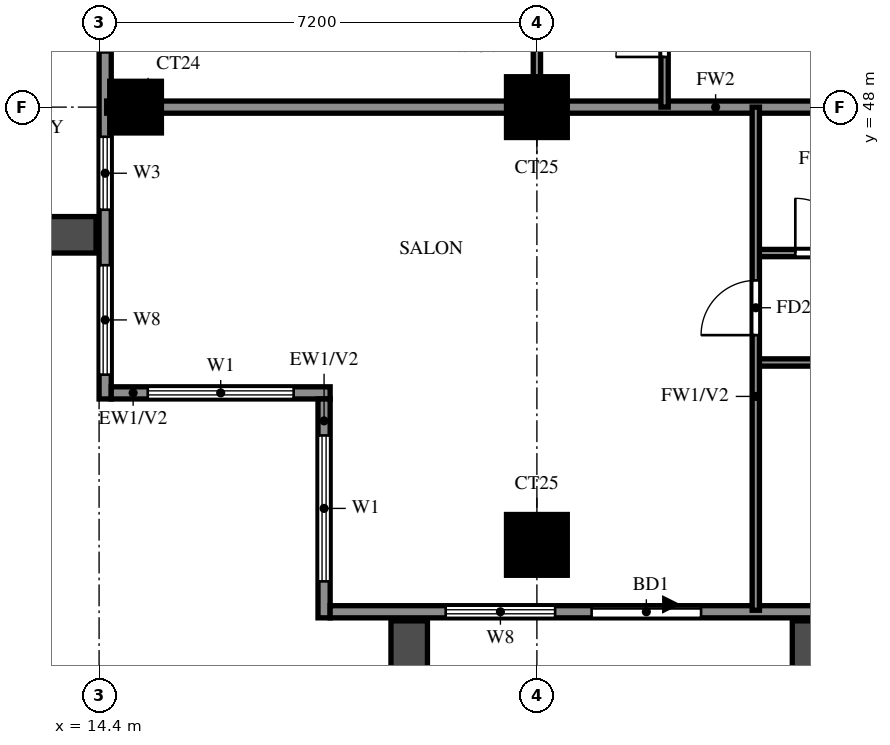
"""IFC4 building model, lengths in metres.
Left out: names, types, materials, properties, quantities, classifications, styles, units other than length and angle.
Written with IfcOpenShell. Run it as: python <this file> out.ifc"""

import sys

from ifc_helpers import new_model, si_unit, direction, frame, frame_2d, origin, origin_2d, place, context, subcontext, project, spatial, rectangle, extrude, source, transform, mapped, element, fill, save


model = new_model("IFC4")
c1 = context("Model", 3, precision=1e-05, world=origin(), true_north=direction((0.0, 1.0)))
c2 = subcontext(c1, "Body", "Model", "MODEL_VIEW")
j1 = project(units=[si_unit("LENGTHUNIT", "METRE"), si_unit("PLANEANGLEUNIT", "RADIAN")], contexts=[c1])
p1 = place(None, origin())
s1 = spatial("IfcSite", under=j1, at=p1, CompositionType="ELEMENT")
p2 = place(p1, origin())
s2 = spatial("IfcBuilding", under=s1, at=p2, CompositionType="ELEMENT")
p3 = place(p2, frame((0.0, 0.0, 171.0)))
s3 = spatial("IfcBuildingStorey", under=s2, at=p3, CompositionType="ELEMENT", Elevation=171.0)
m1 = source(origin(), c2, "Body", "SweptSolid", [
    extrude(rectangle(XDim=1.0, YDim=1.0, at=origin_2d()), origin(), (0.0, 0.0, 1.0), 3.2),
])
p4 = place(p3, frame((21.6, 40.8, 0.0), z_axis=(0.0, 0.0, 1.0), x_axis=(1.0, 0.0, 0.0)))
e1 = element("IfcColumn", 1, at=p4, inside=s3, PredefinedType="COLUMN", context=c2, shape_type="MappedRepresentation", body=[
    mapped(m1, transform((0.0, 0.0, 0.0))),
])
m2 = source(origin(), c2, "Body", "SweptSolid", [
    extrude(rectangle(XDim=0.85, YDim=0.85, at=origin_2d()), origin(), (0.0, 0.0, 1.0), 3.2),
])
p5 = place(p3, frame((15.0, 48.0, 0.0), z_axis=(0.0, 0.0, 1.0), x_axis=(1.0, 0.0, 0.0)))
e2 = element("IfcColumn", 2, at=p5, inside=s3, PredefinedType="COLUMN", context=c2, shape_type="MappedRepresentation", body=[
    mapped(m2, transform((0.0, 0.0, 0.0))),
])
p6 = place(p3, frame((21.6, 48.0, 0.0), z_axis=(0.0, 0.0, 1.0), x_axis=(1.0, 0.0, 0.0)))
e3 = element("IfcColumn", 3, at=p6, inside=s3, PredefinedType="COLUMN", context=c2, shape_type="MappedRepresentation", body=[
    mapped(m1, transform((0.0, 0.0, 0.0))),
])
p7 = place(p3, frame((14.5, 76.6, 0.0), z_axis=(0.0, 0.0, 1.0), x_axis=(0.0, -1.0, 0.0)))
e4 = element("IfcWall", 4, at=p7, inside=s3, PredefinedType="SOLIDWALL", context=c2, shape_type="SweptSolid", body=[
    extrude(rectangle(XDim=33.4, YDim=0.2, at=frame_2d((16.7, 0.0))), origin(), (0.0, 0.0, 1.0), 3.2),
])
p8 = place(p7, frame((11.5, 0.0, 0.0)))
e5 = element("IfcOpeningElement", 5, at=p8, cuts=e4, PredefinedType="OPENING", context=c2, shape_type="SweptSolid", body=[
    extrude(rectangle(XDim=1.8, YDim=2.4, at=frame_2d((0.9, 1.2))), frame((0.0, 0.11, 0.0), z_axis=(0.0, -1.0, 0.0), x_axis=(1.0, 0.0, 0.0)), (0.0, 0.0, 1.0), 0.22),
])
p9 = place(p7, frame((25.9, 0.0, 0.0)))
e6 = element("IfcOpeningElement", 6, at=p9, cuts=e4, PredefinedType="OPENING", context=c2, shape_type="SweptSolid", body=[
    extrude(rectangle(XDim=1.8, YDim=2.4, at=frame_2d((0.9, 1.2))), frame((0.0, 0.11, 0.0), z_axis=(0.0, -1.0, 0.0), x_axis=(1.0, 0.0, 0.0)), (0.0, 0.0, 1.0), 0.22),
])
p10 = place(p7, frame((29.087, 0.0, 0.6)))
e7 = element("IfcOpeningElement", 7, at=p10, cuts=e4, PredefinedType="OPENING", context=c2, shape_type="SweptSolid", body=[
    extrude(rectangle(XDim=1.2, YDim=2.4, at=frame_2d((0.6, 1.2))), frame((0.0, 0.11, 0.0), z_axis=(0.0, -1.0, 0.0), x_axis=(1.0, 0.0, 0.0)), (0.0, 0.0, 1.0), 0.22),
])
p11 = place(p7, frame((31.2, 0.0, 0.6)))
e8 = element("IfcOpeningElement", 8, at=p11, cuts=e4, PredefinedType="OPENING", context=c2, shape_type="SweptSolid", body=[
    extrude(rectangle(XDim=1.8, YDim=2.4, at=frame_2d((0.9, 1.2))), frame((0.0, 0.11, 0.0), z_axis=(0.0, -1.0, 0.0), x_axis=(1.0, 0.0, 0.0)), (0.0, 0.0, 1.0), 0.22),
])
p12 = place(p7, frame((22.337, 0.0, 1.5)))
e9 = element("IfcOpeningElement", 9, at=p12, cuts=e4, PredefinedType="OPENING", context=c2, shape_type="SweptSolid", body=[
    extrude(rectangle(XDim=0.9, YDim=0.9, at=frame_2d((0.45, 0.45))), frame((0.0, 0.11, 0.0), z_axis=(0.0, -1.0, 0.0), x_axis=(1.0, 0.0, 0.0)), (0.0, 0.0, 1.0), 0.22),
])
p13 = place(p7, frame((14.688, 0.0, 0.6)))
e10 = element("IfcOpeningElement", 10, at=p13, cuts=e4, PredefinedType="OPENING", context=c2, shape_type="SweptSolid", body=[
    extrude(rectangle(XDim=1.2, YDim=2.4, at=frame_2d((0.6, 1.2))), frame((0.0, 0.11, 0.0), z_axis=(0.0, -1.0, 0.0), x_axis=(1.0, 0.0, 0.0)), (0.0, 0.0, 1.0), 0.22),
])
p14 = place(p7, frame((17.613, 0.0, 0.6)))
e11 = element("IfcOpeningElement", 11, at=p14, cuts=e4, PredefinedType="OPENING", context=c2, shape_type="SweptSolid", body=[
    extrude(rectangle(XDim=2.4, YDim=2.4, at=frame_2d((1.2, 1.2))), frame((0.0, 0.11, 0.0), z_axis=(0.0, -1.0, 0.0), x_axis=(1.0, 0.0, 0.0)), (0.0, 0.0, 1.0), 0.22),
])
p15 = place(p7, frame((7.938, 0.0, 1.5)))
e12 = element("IfcOpeningElement", 12, at=p15, cuts=e4, PredefinedType="OPENING", context=c2, shape_type="SweptSolid", body=[
    extrude(rectangle(XDim=0.9, YDim=0.9, at=frame_2d((0.45, 0.45))), frame((0.0, 0.11, 0.0), z_axis=(0.0, -1.0, 0.0), x_axis=(1.0, 0.0, 0.0)), (0.0, 0.0, 1.0), 0.22),
])
p16 = place(p7, frame((3.812, 0.0, 0.6)))
e13 = element("IfcOpeningElement", 13, at=p16, cuts=e4, PredefinedType="OPENING", context=c2, shape_type="SweptSolid", body=[
    extrude(rectangle(XDim=2.4, YDim=2.4, at=frame_2d((1.2, 1.2))), frame((0.0, 0.11, 0.0), z_axis=(0.0, -1.0, 0.0), x_axis=(1.0, 0.0, 0.0)), (0.0, 0.0, 1.0), 0.22),
])
p17 = place(p7, frame((0.6, 0.0, 0.6)))
e14 = element("IfcOpeningElement", 14, at=p17, cuts=e4, PredefinedType="OPENING", context=c2, shape_type="SweptSolid", body=[
    extrude(rectangle(XDim=2.4, YDim=2.4, at=frame_2d((1.2, 1.2))), frame((0.0, 0.11, 0.0), z_axis=(0.0, -1.0, 0.0), x_axis=(1.0, 0.0, 0.0)), (0.0, 0.0, 1.0), 0.22),
])
p18 = place(p3, frame((14.6, 43.3, 0.0), z_axis=(0.0, 0.0, 1.0), x_axis=(1.0, 0.0, 0.0)))
e15 = element("IfcWall", 15, at=p18, inside=s3, PredefinedType="SOLIDWALL", context=c2, shape_type="SweptSolid", body=[
    extrude(rectangle(XDim=3.6, YDim=0.2, at=frame_2d((1.8, 0.0))), origin(), (0.0, 0.0, 1.0), 3.2),
])
p19 = place(p18, frame((0.6, 0.0, 0.6)))
e16 = element("IfcOpeningElement", 16, at=p19, cuts=e15, PredefinedType="OPENING", context=c2, shape_type="SweptSolid", body=[
    extrude(rectangle(XDim=2.4, YDim=2.4, at=frame_2d((1.2, 1.2))), frame((0.0, 0.11, 0.0), z_axis=(0.0, -1.0, 0.0), x_axis=(1.0, 0.0, 0.0)), (0.0, 0.0, 1.0), 0.22),
])
p20 = place(p3, frame((18.1, 43.2, 0.0), z_axis=(0.0, 0.0, 1.0), x_axis=(0.0, -1.0, 0.0)))
e17 = element("IfcWall", 17, at=p20, inside=s3, PredefinedType="SOLIDWALL", context=c2, shape_type="SweptSolid", body=[
    extrude(rectangle(XDim=3.6, YDim=0.2, at=frame_2d((1.8, 0.0))), origin(), (0.0, 0.0, 1.0), 3.2),
])
p21 = place(p20, frame((0.6, 0.0, 0.6)))
e18 = element("IfcOpeningElement", 18, at=p21, cuts=e17, PredefinedType="OPENING", context=c2, shape_type="SweptSolid", body=[
    extrude(rectangle(XDim=2.4, YDim=2.4, at=frame_2d((1.2, 1.2))), frame((0.0, 0.11, 0.0), z_axis=(0.0, -1.0, 0.0), x_axis=(1.0, 0.0, 0.0)), (0.0, 0.0, 1.0), 0.22),
])
p22 = place(p3, frame((18.2, 39.7, 0.0), z_axis=(0.0, 0.0, 1.0), x_axis=(1.0, 0.0, 0.0)))
e19 = element("IfcWall", 19, at=p22, inside=s3, PredefinedType="SOLIDWALL", context=c2, shape_type="SweptSolid", body=[
    extrude(rectangle(XDim=23.8, YDim=0.2, at=frame_2d((11.9, 0.0))), origin(), (0.0, 0.0, 1.0), 3.2),
])
p23 = place(p22, frame((4.3, 0.0, 0.0)))
e20 = element("IfcOpeningElement", 20, at=p23, cuts=e19, PredefinedType="OPENING", context=c2, shape_type="SweptSolid", body=[
    extrude(rectangle(XDim=1.8, YDim=2.4, at=frame_2d((0.9, 1.2))), frame((0.0, 0.11, 0.0), z_axis=(0.0, -1.0, 0.0), x_axis=(1.0, 0.0, 0.0)), (0.0, 0.0, 1.0), 0.22),
])
p24 = place(p22, frame((1.9, 0.0, 0.6)))
e21 = element("IfcOpeningElement", 21, at=p24, cuts=e19, PredefinedType="OPENING", context=c2, shape_type="SweptSolid", body=[
    extrude(rectangle(XDim=1.8, YDim=2.4, at=frame_2d((0.9, 1.2))), frame((0.0, 0.11, 0.0), z_axis=(0.0, -1.0, 0.0), x_axis=(1.0, 0.0, 0.0)), (0.0, 0.0, 1.0), 0.22),
])
p25 = place(p22, frame((8.5, 0.0, 0.6)))
e22 = element("IfcOpeningElement", 22, at=p25, cuts=e19, PredefinedType="OPENING", context=c2, shape_type="SweptSolid", body=[
    extrude(rectangle(XDim=1.8, YDim=2.4, at=frame_2d((0.9, 1.2))), frame((0.0, 0.11, 0.0), z_axis=(0.0, -1.0, 0.0), x_axis=(1.0, 0.0, 0.0)), (0.0, 0.0, 1.0), 0.22),
])
p26 = place(p22, frame((11.8, 0.0, 0.6)))
e23 = element("IfcOpeningElement", 23, at=p26, cuts=e19, PredefinedType="OPENING", context=c2, shape_type="SweptSolid", body=[
    extrude(rectangle(XDim=2.4, YDim=2.4, at=frame_2d((1.2, 1.2))), frame((0.0, 0.11, 0.0), z_axis=(0.0, -1.0, 0.0), x_axis=(1.0, 0.0, 0.0)), (0.0, 0.0, 1.0), 0.22),
])
for number, where, z_axis, x_axis in (
    (24, (14.35, 45.9, 0.0), (0.0, 0.0, 1.0), (-1.0, 0.0, 0.0)),
    (25, (19.5, 39.55, 0.0), (0.0, 0.0, 1.0), (0.0, -1.0, 0.0)),
    (26, (26.1, 39.55, 0.0), (0.0, 0.0, 1.0), (0.0, -1.0, 0.0)),
):
    element("IfcWall", number, at=place(p3, frame(where, z_axis=z_axis, x_axis=x_axis)), inside=s3, PredefinedType="SOLIDWALL", context=c2, shape_type="SweptSolid", body=[
        extrude(rectangle(XDim=2.65, YDim=0.6, at=frame_2d((1.325, 0.0))), origin(), (0.0, 0.0, 1.0), 2.85),
    ])
p27 = place(p3, frame((14.525, 48.0, 0.0), z_axis=(0.0, 0.0, 1.0), x_axis=(1.0, 0.0, 0.0)))
e27 = element("IfcWall", 27, at=p27, inside=s3, PredefinedType="SOLIDWALL", context=c2, shape_type="SweptSolid", body=[
    extrude(rectangle(XDim=19.075, YDim=0.2, at=frame_2d((9.538, 0.0))), origin(), (0.0, 0.0, 1.0), 3.2),
])
p28 = place(p3, frame((25.2, 43.8, 0.0), z_axis=(0.0, 0.0, 1.0), x_axis=(1.0, 0.0, 0.0)))
e28 = element("IfcWall", 28, at=p28, inside=s3, PredefinedType="PARTITIONING", context=c2, shape_type="SweptSolid", body=[
    extrude(rectangle(XDim=8.4, YDim=0.12, at=frame_2d((4.2, 0.0))), origin(), (0.0, 0.0, 1.0), 3.2),
])
p29 = place(p28, frame((1.35, 0.0, 0.0)))
e29 = element("IfcOpeningElement", 29, at=p29, cuts=e28, PredefinedType="OPENING", context=c2, shape_type="SweptSolid", body=[
    extrude(rectangle(XDim=0.9, YDim=2.1, at=frame_2d((0.45, 1.05))), frame((0.0, 0.07, 0.0), z_axis=(0.0, -1.0, 0.0), x_axis=(1.0, 0.0, 0.0)), (0.0, 0.0, 1.0), 0.14),
])
p30 = place(p28, frame((5.55, 0.0, 0.0)))
e30 = element("IfcOpeningElement", 30, at=p30, cuts=e28, PredefinedType="OPENING", context=c2, shape_type="SweptSolid", body=[
    extrude(rectangle(XDim=0.9, YDim=2.1, at=frame_2d((0.45, 1.05))), frame((0.0, 0.07, 0.0), z_axis=(0.0, -1.0, 0.0), x_axis=(1.0, 0.0, 0.0)), (0.0, 0.0, 1.0), 0.14),
])
p31 = place(p3, frame((25.2, 45.6, 0.0), z_axis=(0.0, 0.0, 1.0), x_axis=(1.0, 0.0, 0.0)))
e31 = element("IfcWall", 31, at=p31, inside=s3, PredefinedType="PARTITIONING", context=c2, shape_type="SweptSolid", body=[
    extrude(rectangle(XDim=6.0, YDim=0.12, at=frame_2d((3.0, 0.0))), origin(), (0.0, 0.0, 1.0), 3.2),
])
p32 = place(p31, frame((0.65, 0.0, 0.0)))
e32 = element("IfcOpeningElement", 32, at=p32, cuts=e31, PredefinedType="OPENING", context=c2, shape_type="SweptSolid", body=[
    extrude(rectangle(XDim=0.9, YDim=2.1, at=frame_2d((0.45, 1.05))), frame((0.0, 0.07, 0.0), z_axis=(0.0, -1.0, 0.0), x_axis=(1.0, 0.0, 0.0)), (0.0, 0.0, 1.0), 0.14),
])
p33 = place(p31, frame((3.65, 0.0, 0.0)))
e33 = element("IfcOpeningElement", 33, at=p33, cuts=e31, PredefinedType="OPENING", context=c2, shape_type="SweptSolid", body=[
    extrude(rectangle(XDim=0.9, YDim=2.1, at=frame_2d((0.45, 1.05))), frame((0.0, 0.07, 0.0), z_axis=(0.0, -1.0, 0.0), x_axis=(1.0, 0.0, 0.0)), (0.0, 0.0, 1.0), 0.14),
])
p34 = place(p3, frame((21.6, 48.0, 0.0), z_axis=(0.0, 0.0, 1.0), x_axis=(0.0, 1.0, 0.0)))
e34 = element("IfcWall", 34, at=p34, inside=s3, PredefinedType="PARTITIONING", context=c2, shape_type="SweptSolid", body=[
    extrude(rectangle(XDim=3.6, YDim=0.12, at=frame_2d((1.8, 0.0))), origin(), (0.0, 0.0, 1.0), 3.2),
])
p35 = place(p34, frame((1.35, 0.0, 0.0)))
e35 = element("IfcOpeningElement", 35, at=p35, cuts=e34, PredefinedType="OPENING", context=c2, shape_type="SweptSolid", body=[
    extrude(rectangle(XDim=0.9, YDim=2.1, at=frame_2d((0.45, 1.05))), frame((0.0, 0.07, 0.0), z_axis=(0.0, -1.0, 0.0), x_axis=(1.0, 0.0, 0.0)), (0.0, 0.0, 1.0), 0.14),
])
p36 = place(p3, frame((23.7, 48.0, 0.0), z_axis=(0.0, 0.0, 1.0), x_axis=(0.0, 1.0, 0.0)))
e36 = element("IfcWall", 36, at=p36, inside=s3, PredefinedType="PARTITIONING", context=c2, shape_type="SweptSolid", body=[
    extrude(rectangle(XDim=6.0, YDim=0.12, at=frame_2d((3.0, 0.0))), origin(), (0.0, 0.0, 1.0), 3.2),
])
p37 = place(p36, frame((0.825, 0.0, 0.0)))
e37 = element("IfcOpeningElement", 37, at=p37, cuts=e36, PredefinedType="OPENING", context=c2, shape_type="SweptSolid", body=[
    extrude(rectangle(XDim=0.8, YDim=2.1, at=frame_2d((0.4, 1.05))), frame((0.0, 0.07, 0.0), z_axis=(0.0, -1.0, 0.0), x_axis=(1.0, 0.0, 0.0)), (0.0, 0.0, 1.0), 0.14),
])
p38 = place(p3, frame((25.2, 39.725, 0.0), z_axis=(0.0, 0.0, 1.0), x_axis=(0.0, 1.0, 0.0)))
e38 = element("IfcWall", 38, at=p38, inside=s3, PredefinedType="PARTITIONING", context=c2, shape_type="SweptSolid", body=[
    extrude(rectangle(XDim=8.275, YDim=0.12, at=frame_2d((4.137, 0.0))), origin(), (0.0, 0.0, 1.0), 3.2),
])
p39 = place(p38, frame((4.525, 0.0, 0.0)))
e39 = element("IfcOpeningElement", 39, at=p39, cuts=e38, PredefinedType="OPENING", context=c2, shape_type="SweptSolid", body=[
    extrude(rectangle(XDim=0.9, YDim=2.1, at=frame_2d((0.45, 1.05))), frame((0.0, 0.07, 0.0), z_axis=(0.0, -1.0, 0.0), x_axis=(1.0, 0.0, 0.0)), (0.0, 0.0, 1.0), 0.14),
])
p40 = place(p10, origin())
e40 = element("IfcWindow", 40, at=p40, inside=s3, PartitioningType="SINGLE_PANEL", PredefinedType="WINDOW", context=c2, shape_type="SweptSolid", body=[
    extrude(rectangle(XDim=1.2, YDim=2.4, at=frame_2d((0.6, 1.2))), frame((0.0, 0.03, 0.0), z_axis=(0.0, -1.0, 0.0), x_axis=(1.0, 0.0, 0.0)), (0.0, 0.0, 1.0), 0.06),
])
fill(e7, e40)
p41 = place(p11, origin())
e41 = element("IfcWindow", 41, at=p41, inside=s3, PartitioningType="DOUBLE_PANEL_VERTICAL", PredefinedType="WINDOW", context=c2, shape_type="SweptSolid", body=[
    extrude(rectangle(XDim=1.8, YDim=2.4, at=frame_2d((0.9, 1.2))), frame((0.0, 0.03, 0.0), z_axis=(0.0, -1.0, 0.0), x_axis=(1.0, 0.0, 0.0)), (0.0, 0.0, 1.0), 0.06),
])
fill(e8, e41)
p42 = place(p19, origin())
e42 = element("IfcWindow", 42, at=p42, inside=s3, PartitioningType="DOUBLE_PANEL_VERTICAL", PredefinedType="WINDOW", context=c2, shape_type="SweptSolid", body=[
    extrude(rectangle(XDim=2.4, YDim=2.4, at=frame_2d((1.2, 1.2))), frame((0.0, 0.03, 0.0), z_axis=(0.0, -1.0, 0.0), x_axis=(1.0, 0.0, 0.0)), (0.0, 0.0, 1.0), 0.06),
])
fill(e16, e42)
p43 = place(p21, origin())
e43 = element("IfcWindow", 43, at=p43, inside=s3, PartitioningType="DOUBLE_PANEL_VERTICAL", PredefinedType="WINDOW", context=c2, shape_type="SweptSolid", body=[
    extrude(rectangle(XDim=2.4, YDim=2.4, at=frame_2d((1.2, 1.2))), frame((0.0, 0.03, 0.0), z_axis=(0.0, -1.0, 0.0), x_axis=(1.0, 0.0, 0.0)), (0.0, 0.0, 1.0), 0.06),
])
fill(e18, e43)
p44 = place(p23, origin())
e44 = element("IfcDoor", 44, at=p44, inside=s3, OperationType="DOUBLE_DOOR_SLIDING", PredefinedType="DOOR", context=c2, shape_type="SweptSolid", body=[
    extrude(rectangle(XDim=1.8, YDim=2.4, at=frame_2d((0.9, 1.2))), frame((0.0, 0.025, 0.0), z_axis=(0.0, -1.0, 0.0), x_axis=(1.0, 0.0, 0.0)), (0.0, 0.0, 1.0), 0.05),
])
fill(e20, e44)
p45 = place(p24, origin())
e45 = element("IfcWindow", 45, at=p45, inside=s3, PartitioningType="DOUBLE_PANEL_VERTICAL", PredefinedType="WINDOW", context=c2, shape_type="SweptSolid", body=[
    extrude(rectangle(XDim=1.8, YDim=2.4, at=frame_2d((0.9, 1.2))), frame((0.0, 0.03, 0.0), z_axis=(0.0, -1.0, 0.0), x_axis=(1.0, 0.0, 0.0)), (0.0, 0.0, 1.0), 0.06),
])
fill(e21, e45)
p46 = place(p39, origin())
e46 = element("IfcDoor", 46, at=p46, inside=s3, OperationType="SINGLE_SWING_LEFT", PredefinedType="DOOR", context=c2, shape_type="SweptSolid", body=[
    extrude(rectangle(XDim=0.9, YDim=2.1, at=frame_2d((0.45, 1.05))), frame((0.0, 0.025, 0.0), z_axis=(0.0, -1.0, 0.0), x_axis=(1.0, 0.0, 0.0)), (0.0, 0.0, 1.0), 0.05),
])
fill(e39, e46)
p47 = place(p32, origin())
e47 = element("IfcDoor", 47, at=p47, inside=s3, OperationType="SINGLE_SWING_LEFT", PredefinedType="DOOR", context=c2, shape_type="SweptSolid", body=[
    extrude(rectangle(XDim=0.9, YDim=2.1, at=frame_2d((0.45, 1.05))), frame((0.0, 0.025, 0.0), z_axis=(0.0, -1.0, 0.0), x_axis=(1.0, 0.0, 0.0)), (0.0, 0.0, 1.0), 0.05),
])
fill(e32, e47)
p48 = place(p37, origin())
e48 = element("IfcDoor", 48, at=p48, inside=s3, OperationType="SINGLE_SWING_LEFT", PredefinedType="DOOR", context=c2, shape_type="SweptSolid", body=[
    extrude(rectangle(XDim=0.8, YDim=2.1, at=frame_2d((0.4, 1.05))), frame((0.0, 0.025, 0.0), z_axis=(0.0, -1.0, 0.0), x_axis=(1.0, 0.0, 0.0)), (0.0, 0.0, 1.0), 0.05),
])
fill(e37, e48)
save(model, sys.argv[1])
